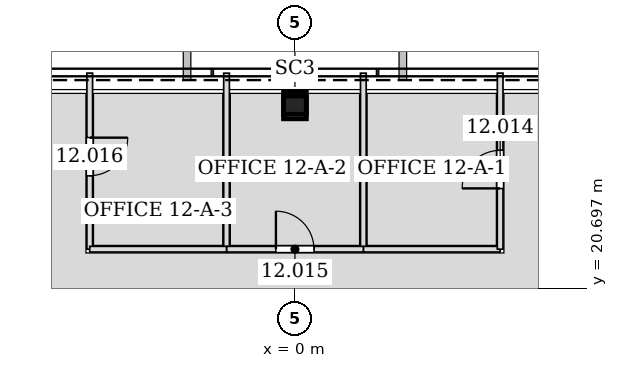
"""IFC4 building model, lengths in metres.
Left out: names, types, materials, properties, quantities, classifications, styles, units other than length and angle.
Written with IfcOpenShell. Run it as: python <this file> out.ifc"""

import sys

from ifc_helpers import new_model, si_unit, direction, frame, frame_2d, origin, origin_2d, place, context, subcontext, project, spatial, rectangle, hollow_rectangle, extrude, element, fill, save


model = new_model("IFC4")
c1 = context("Model", 3, precision=1e-05, world=origin(), true_north=direction((0.0, 1.0)))
c2 = subcontext(c1, "Body", "Model", "MODEL_VIEW")
j1 = project(units=[si_unit("LENGTHUNIT", "METRE"), si_unit("PLANEANGLEUNIT", "RADIAN")], contexts=[c1])
p1 = place(None, origin())
s1 = spatial("IfcSite", under=j1, at=p1, CompositionType="ELEMENT")
p2 = place(p1, origin())
s2 = spatial("IfcBuilding", under=s1, at=p2, CompositionType="ELEMENT")
p3 = place(p2, frame((0.0, 0.0, 58.2)))
s3 = spatial("IfcBuildingStorey", under=s2, at=p3, CompositionType="ELEMENT", Elevation=58.2)
p4 = place(p3, frame((0.0, 25.568, 0.0), z_axis=(0.0, -0.028297679255, 0.99959954049), x_axis=(1.0, 0.0, 0.0)))
e1 = element("IfcColumn", 1, at=p4, inside=s3, PredefinedType="COLUMN", context=c2, shape_type="SweptSolid", body=[
    extrude(hollow_rectangle(XDim=0.6, YDim=0.6, WallThickness=0.032, at=origin_2d()), origin(), (0.0, 0.0, 1.0), 4.202),
])
p5 = place(p3, frame((1.8, 26.35, 0.0), z_axis=(0.0, 0.0, 1.0), x_axis=(0.0, -1.0, 0.0)))
e2 = element("IfcWall", 2, at=p5, inside=s3, PredefinedType="PARTITIONING", context=c2, shape_type="SweptSolid", body=[
    extrude(rectangle(XDim=4.632, YDim=0.15, at=frame_2d((2.316, 0.0))), origin(), (0.0, 0.0, 1.0), 3.423),
])
p6 = place(p3, frame((1.8, 21.718, 0.0), z_axis=(0.0, 0.0, 1.0), x_axis=(1.0, 0.0, 0.0)))
e3 = element("IfcWall", 3, at=p6, inside=s3, PredefinedType="PARTITIONING", context=c2, shape_type="SweptSolid", body=[
    extrude(rectangle(XDim=3.6, YDim=0.15, at=frame_2d((1.8, 0.0))), origin(), (0.0, 0.0, 1.0), 4.035),
])
p7 = place(p3, frame((5.4, 21.718, 0.0), z_axis=(0.0, 0.0, 1.0), x_axis=(0.0, 1.0, 0.0)))
e4 = element("IfcWall", 4, at=p7, inside=s3, PredefinedType="PARTITIONING", context=c2, shape_type="SweptSolid", body=[
    extrude(rectangle(XDim=4.634, YDim=0.15, at=frame_2d((2.317, 0.0))), origin(), (0.0, 0.0, 1.0), 3.423),
])
p8 = place(p7, frame((1.6, 0.0, 0.0)))
e5 = element("IfcOpeningElement", 5, at=p8, cuts=e4, PredefinedType="OPENING", context=c2, shape_type="SweptSolid", body=[
    extrude(rectangle(XDim=1.0, YDim=2.1, at=frame_2d((0.5, 1.05))), frame((0.0, 0.085, 0.0), z_axis=(0.0, -1.0, 0.0), x_axis=(1.0, 0.0, 0.0)), (0.0, 0.0, 1.0), 0.17),
])
p9 = place(p3, frame((-1.8, 26.35, 0.0), z_axis=(0.0, 0.0, 1.0), x_axis=(0.0, -1.0, 0.0)))
e6 = element("IfcWall", 6, at=p9, inside=s3, PredefinedType="PARTITIONING", context=c2, shape_type="SweptSolid", body=[
    extrude(rectangle(XDim=4.632, YDim=0.15, at=frame_2d((2.316, 0.0))), origin(), (0.0, 0.0, 1.0), 3.423),
])
p10 = place(p3, frame((-1.8, 21.718, 0.0), z_axis=(0.0, 0.0, 1.0), x_axis=(1.0, 0.0, 0.0)))
e7 = element("IfcWall", 7, at=p10, inside=s3, PredefinedType="PARTITIONING", context=c2, shape_type="SweptSolid", body=[
    extrude(rectangle(XDim=3.6, YDim=0.15, at=frame_2d((1.8, 0.0))), origin(), (0.0, 0.0, 1.0), 2.984),
])
p11 = place(p10, frame((1.3, 0.0, 0.0)))
e8 = element("IfcOpeningElement", 8, at=p11, cuts=e7, PredefinedType="OPENING", context=c2, shape_type="SweptSolid", body=[
    extrude(rectangle(XDim=1.0, YDim=2.1, at=frame_2d((0.5, 1.05))), frame((0.0, 0.085, 0.0), z_axis=(0.0, -1.0, 0.0), x_axis=(1.0, 0.0, 0.0)), (0.0, 0.0, 1.0), 0.17),
])
p12 = place(p3, frame((-5.4, 26.352, 0.0), z_axis=(0.0, 0.0, 1.0), x_axis=(0.0, -1.0, 0.0)))
e9 = element("IfcWall", 9, at=p12, inside=s3, PredefinedType="PARTITIONING", context=c2, shape_type="SweptSolid", body=[
    extrude(rectangle(XDim=4.634, YDim=0.15, at=frame_2d((2.317, 0.0))), origin(), (0.0, 0.0, 1.0), 3.423),
])
p13 = place(p12, frame((1.699, 0.0, 0.0)))
e10 = element("IfcOpeningElement", 10, at=p13, cuts=e9, PredefinedType="OPENING", context=c2, shape_type="SweptSolid", body=[
    extrude(rectangle(XDim=1.0, YDim=2.1, at=frame_2d((0.5, 1.05))), frame((0.0, 0.085, 0.0), z_axis=(0.0, -1.0, 0.0), x_axis=(1.0, 0.0, 0.0)), (0.0, 0.0, 1.0), 0.17),
])
p14 = place(p3, frame((-5.4, 21.718, 0.0), z_axis=(0.0, 0.0, 1.0), x_axis=(1.0, 0.0, 0.0)))
e11 = element("IfcWall", 11, at=p14, inside=s3, PredefinedType="PARTITIONING", context=c2, shape_type="SweptSolid", body=[
    extrude(rectangle(XDim=3.6, YDim=0.15, at=frame_2d((1.8, 0.0))), origin(), (0.0, 0.0, 1.0), 4.035),
])
p15 = place(p8, origin())
e12 = element("IfcDoor", 12, at=p15, inside=s3, OperationType="SINGLE_SWING_LEFT", PredefinedType="DOOR", context=c2, shape_type="SweptSolid", body=[
    extrude(rectangle(XDim=1.0, YDim=2.1, at=frame_2d((0.5, 1.05))), frame((0.0, 0.025, 0.0), z_axis=(0.0, -1.0, 0.0), x_axis=(1.0, 0.0, 0.0)), (0.0, 0.0, 1.0), 0.05),
])
fill(e5, e12)
p16 = place(p11, origin())
e13 = element("IfcDoor", 13, at=p16, inside=s3, OperationType="SINGLE_SWING_LEFT", PredefinedType="DOOR", context=c2, shape_type="SweptSolid", body=[
    extrude(rectangle(XDim=1.0, YDim=2.1, at=frame_2d((0.5, 1.05))), frame((0.0, 0.025, 0.0), z_axis=(0.0, -1.0, 0.0), x_axis=(1.0, 0.0, 0.0)), (0.0, 0.0, 1.0), 0.05),
])
fill(e8, e13)
p17 = place(p13, origin())
e14 = element("IfcDoor", 14, at=p17, inside=s3, OperationType="SINGLE_SWING_LEFT", PredefinedType="DOOR", context=c2, shape_type="SweptSolid", body=[
    extrude(rectangle(XDim=1.0, YDim=2.1, at=frame_2d((0.5, 1.05))), frame((0.0, 0.025, 0.0), z_axis=(0.0, -1.0, 0.0), x_axis=(1.0, 0.0, 0.0)), (0.0, 0.0, 1.0), 0.05),
])
fill(e10, e14)
save(model, sys.argv[1])
